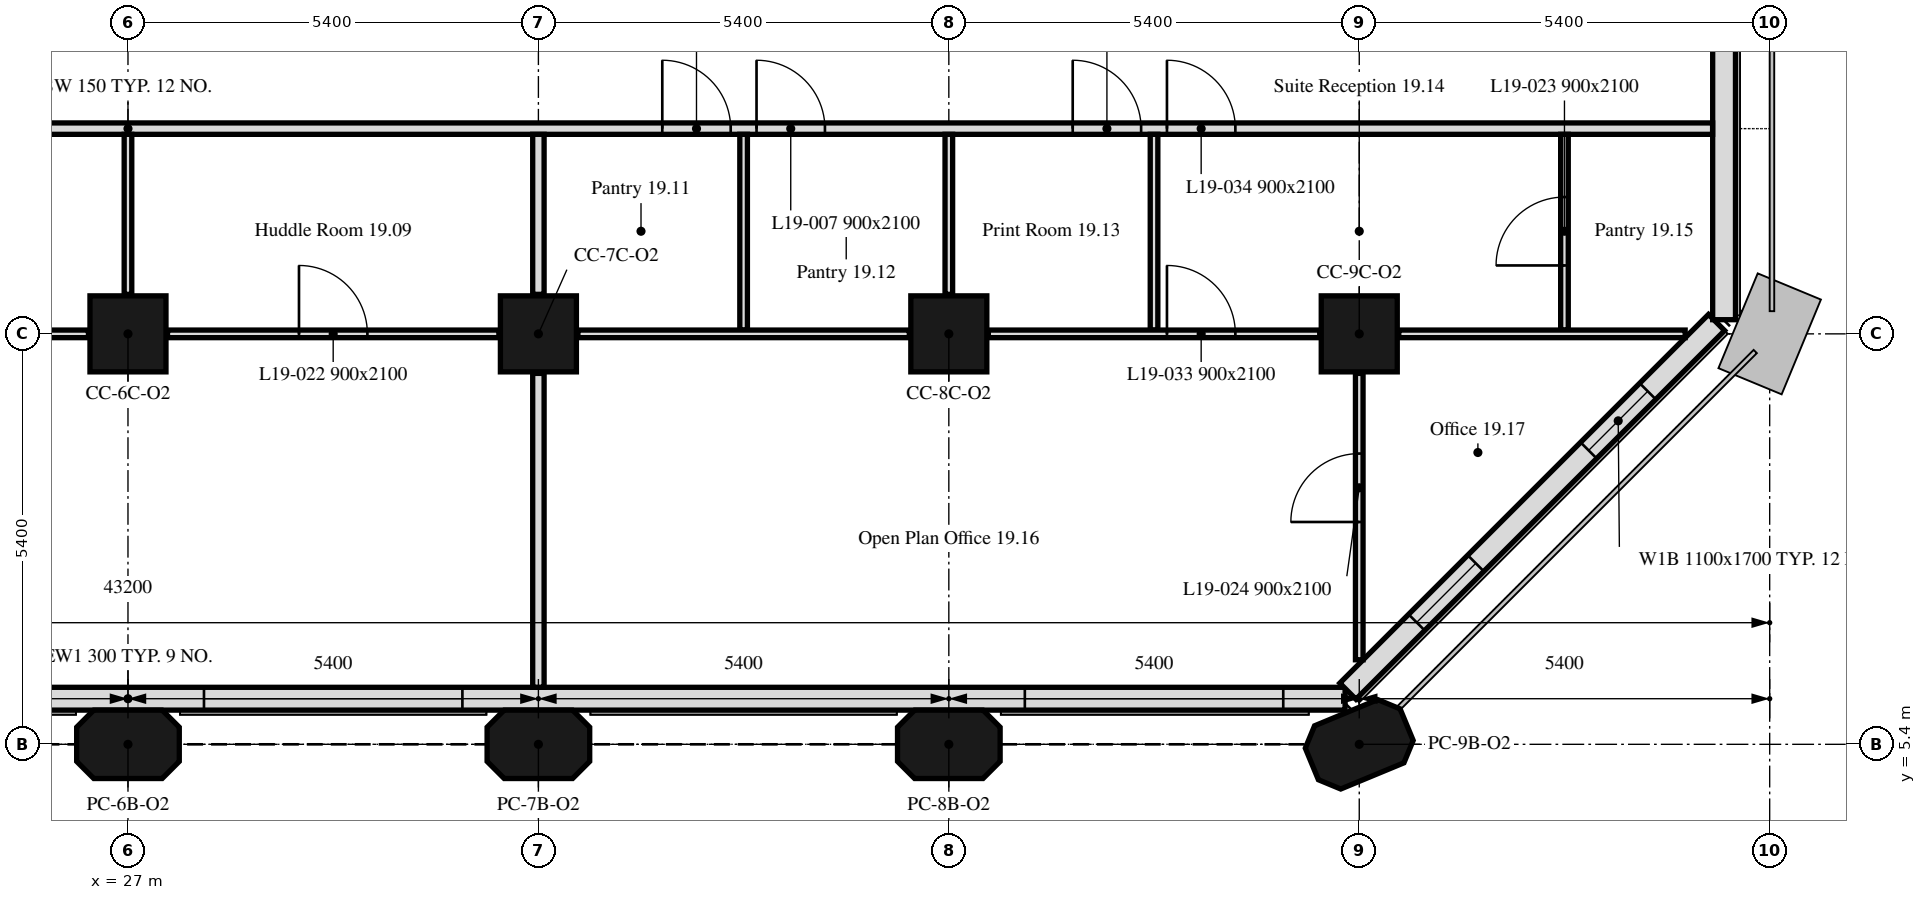
"""IFC4 building model, lengths in metres.
Left out: names, types, materials, properties, quantities, classifications, styles, units other than length and angle.
Written with IfcOpenShell. Run it as: python <this file> out.ifc"""

import sys

from ifc_helpers import new_model, si_unit, direction, frame, frame_2d, origin, origin_2d, place, context, subcontext, project, spatial, polyline, rectangle, outline, extrude, element, fill, save


model = new_model("IFC4")
c1 = context("Model", 3, precision=1e-05, world=origin(), true_north=direction((0.0, 1.0)))
c2 = subcontext(c1, "Body", "Model", "MODEL_VIEW")
j1 = project(units=[si_unit("LENGTHUNIT", "METRE"), si_unit("PLANEANGLEUNIT", "RADIAN")], contexts=[c1])
p1 = place(None, origin())
s1 = spatial("IfcSite", under=j1, at=p1, CompositionType="ELEMENT")
p2 = place(p1, origin())
s2 = spatial("IfcBuilding", under=s1, at=p2, CompositionType="ELEMENT")
p3 = place(p2, frame((0.0, 0.0, 84.0)))
s3 = spatial("IfcBuildingStorey", under=s2, at=p3, CompositionType="ELEMENT", Elevation=84.0)
for number, where, z_axis, x_axis in (
    (1, (27.0, 5.4, 0.0), (0.0, 0.0, 1.0), (1.0, 0.0, 0.0)),
    (2, (32.4, 5.4, 0.0), (0.0, 0.0, 1.0), (1.0, 0.0, 0.0)),
    (3, (37.8, 5.4, 0.0), (0.0, 0.0, 1.0), (1.0, 0.0, 0.0)),
    (4, (43.2, 5.4, 0.0), (0.0, 0.0, 1.0), (0.924, 0.383, 0.0)),
):
    element("IfcColumn", number, at=place(p3, frame(where, z_axis=z_axis, x_axis=x_axis)), inside=s3, PredefinedType="COLUMN", context=c2, shape_type="SweptSolid", body=[
        extrude(outline(polyline([(-0.45, -0.45), (0.45, -0.45), (0.675, -0.225), (0.675, 0.225), (0.45, 0.45), (-0.45, 0.45), (-0.675, 0.225), (-0.675, -0.225), (-0.45, -0.45)])), origin(), (0.0, 0.0, 1.0), 3.5),
    ])
for number, where, z_axis, x_axis in (
    (5, (27.0, 10.8, 0.0), (0.0, 0.0, 1.0), (1.0, 0.0, 0.0)),
    (6, (32.4, 10.8, 0.0), (0.0, 0.0, 1.0), (1.0, 0.0, 0.0)),
    (7, (37.8, 10.8, 0.0), (0.0, 0.0, 1.0), (1.0, 0.0, 0.0)),
    (8, (43.2, 10.8, 0.0), (0.0, 0.0, 1.0), (1.0, 0.0, 0.0)),
):
    element("IfcColumn", number, at=place(p3, frame(where, z_axis=z_axis, x_axis=x_axis)), inside=s3, PredefinedType="COLUMN", context=c2, shape_type="SweptSolid", body=[
        extrude(rectangle(XDim=1.0, YDim=1.0, at=origin_2d()), origin(), (0.0, 0.0, 1.0), 3.5),
    ])
p4 = place(p3, frame((10.986, 6.0, 0.0), z_axis=(0.0, 0.0, 1.0), x_axis=(1.0, 0.0, 0.0)))
e9 = element("IfcWall", 9, at=p4, inside=s3, PredefinedType="SOLIDWALL", context=c2, shape_type="SweptSolid", body=[
    extrude(rectangle(XDim=32.027, YDim=0.3, at=frame_2d((16.014, 0.0))), origin(), (0.0, 0.0, 1.0), 3.5),
])
p5 = place(p4, frame((6.214, 0.0, 0.9)))
e10 = element("IfcOpeningElement", 10, at=p5, cuts=e9, PredefinedType="OPENING", context=c2, shape_type="SweptSolid", body=[
    extrude(rectangle(XDim=3.4, YDim=1.7, at=frame_2d((1.7, 0.85))), frame((0.0, 0.16, 0.0), z_axis=(0.0, -1.0, 0.0), x_axis=(1.0, 0.0, 0.0)), (0.0, 0.0, 1.0), 0.32),
])
p6 = place(p4, frame((17.014, 0.0, 0.9)))
e11 = element("IfcOpeningElement", 11, at=p6, cuts=e9, PredefinedType="OPENING", context=c2, shape_type="SweptSolid", body=[
    extrude(rectangle(XDim=3.4, YDim=1.7, at=frame_2d((1.7, 0.85))), frame((0.0, 0.16, 0.0), z_axis=(0.0, -1.0, 0.0), x_axis=(1.0, 0.0, 0.0)), (0.0, 0.0, 1.0), 0.32),
])
p7 = place(p4, frame((27.814, 0.0, 0.9)))
e12 = element("IfcOpeningElement", 12, at=p7, cuts=e9, PredefinedType="OPENING", context=c2, shape_type="SweptSolid", body=[
    extrude(rectangle(XDim=3.4, YDim=1.7, at=frame_2d((1.7, 0.85))), frame((0.0, 0.16, 0.0), z_axis=(0.0, -1.0, 0.0), x_axis=(1.0, 0.0, 0.0)), (0.0, 0.0, 1.0), 0.32),
])
p8 = place(p3, frame((43.051, 6.099, 0.0), z_axis=(0.0, 0.0, 1.0), x_axis=(0.707106781187, 0.707106781187, 0.0)))
e13 = element("IfcWall", 13, at=p8, inside=s3, PredefinedType="SOLIDWALL", context=c2, shape_type="SweptSolid", body=[
    extrude(rectangle(XDim=6.86, YDim=0.3, at=frame_2d((3.43, 0.0))), origin(), (0.0, 0.0, 1.0), 3.5),
])
p9 = place(p8, frame((1.28, 0.0, 0.9)))
e14 = element("IfcOpeningElement", 14, at=p9, cuts=e13, PredefinedType="OPENING", context=c2, shape_type="SweptSolid", body=[
    extrude(rectangle(XDim=1.1, YDim=1.7, at=frame_2d((0.55, 0.85))), frame((0.0, 0.16, 0.0), z_axis=(0.0, -1.0, 0.0), x_axis=(1.0, 0.0, 0.0)), (0.0, 0.0, 1.0), 0.32),
])
p10 = place(p8, frame((4.48, 0.0, 0.9)))
e15 = element("IfcOpeningElement", 15, at=p10, cuts=e13, PredefinedType="OPENING", context=c2, shape_type="SweptSolid", body=[
    extrude(rectangle(XDim=1.1, YDim=1.7, at=frame_2d((0.55, 0.85))), frame((0.0, 0.16, 0.0), z_axis=(0.0, -1.0, 0.0), x_axis=(1.0, 0.0, 0.0)), (0.0, 0.0, 1.0), 0.32),
])
p11 = place(p3, frame((48.0, 10.986, 0.0), z_axis=(0.0, 0.0, 1.0), x_axis=(0.0, 1.0, 0.0)))
e16 = element("IfcWall", 16, at=p11, inside=s3, PredefinedType="SOLIDWALL", context=c2, shape_type="SweptSolid", body=[
    extrude(rectangle(XDim=32.027, YDim=0.3, at=frame_2d((16.014, 0.0))), origin(), (0.0, 0.0, 1.0), 3.5),
])
p12 = place(p11, frame((6.214, 0.0, 0.9)))
e17 = element("IfcOpeningElement", 17, at=p12, cuts=e16, PredefinedType="OPENING", context=c2, shape_type="SweptSolid", body=[
    extrude(rectangle(XDim=3.4, YDim=1.7, at=frame_2d((1.7, 0.85))), frame((0.0, 0.16, 0.0), z_axis=(0.0, -1.0, 0.0), x_axis=(1.0, 0.0, 0.0)), (0.0, 0.0, 1.0), 0.32),
])
p13 = place(p11, frame((17.014, 0.0, 0.9)))
e18 = element("IfcOpeningElement", 18, at=p13, cuts=e16, PredefinedType="OPENING", context=c2, shape_type="SweptSolid", body=[
    extrude(rectangle(XDim=3.4, YDim=1.7, at=frame_2d((1.7, 0.85))), frame((0.0, 0.16, 0.0), z_axis=(0.0, -1.0, 0.0), x_axis=(1.0, 0.0, 0.0)), (0.0, 0.0, 1.0), 0.32),
])
p14 = place(p11, frame((27.814, 0.0, 0.9)))
e19 = element("IfcOpeningElement", 19, at=p14, cuts=e16, PredefinedType="OPENING", context=c2, shape_type="SweptSolid", body=[
    extrude(rectangle(XDim=3.4, YDim=1.7, at=frame_2d((1.7, 0.85))), frame((0.0, 0.16, 0.0), z_axis=(0.0, -1.0, 0.0), x_axis=(1.0, 0.0, 0.0)), (0.0, 0.0, 1.0), 0.32),
])
p15 = place(p3, frame((6.151, 13.5, 0.0), z_axis=(0.0, 0.0, 1.0), x_axis=(1.0, 0.0, 0.0)))
e20 = element("IfcWall", 20, at=p15, inside=s3, PredefinedType="PARTITIONING", context=c2, shape_type="SweptSolid", body=[
    extrude(rectangle(XDim=41.698, YDim=0.15, at=frame_2d((20.849, 0.0))), origin(), (0.0, 0.0, 1.0), 3.5),
])
p16 = place(p15, frame((11.679, 0.0, 0.0)))
e21 = element("IfcOpeningElement", 21, at=p16, cuts=e20, PredefinedType="OPENING", context=c2, shape_type="SweptSolid", body=[
    extrude(rectangle(XDim=0.9, YDim=2.1, at=frame_2d((0.45, 1.05))), frame((0.0, 0.075, 0.0), z_axis=(0.0, -1.0, 0.0), x_axis=(1.0, 0.0, 0.0)), (0.0, 0.0, 1.0), 0.15),
])
p17 = place(p15, frame((27.879, 0.0, 0.0)))
e22 = element("IfcOpeningElement", 22, at=p17, cuts=e20, PredefinedType="OPENING", context=c2, shape_type="SweptSolid", body=[
    extrude(rectangle(XDim=0.9, YDim=2.1, at=frame_2d((0.45, 1.05))), frame((0.0, 0.075, 0.0), z_axis=(0.0, -1.0, 0.0), x_axis=(1.0, 0.0, 0.0)), (0.0, 0.0, 1.0), 0.15),
])
p18 = place(p15, frame((29.119, 0.0, 0.0)))
e23 = element("IfcOpeningElement", 23, at=p18, cuts=e20, PredefinedType="OPENING", context=c2, shape_type="SweptSolid", body=[
    extrude(rectangle(XDim=0.9, YDim=2.1, at=frame_2d((0.45, 1.05))), frame((0.0, 0.075, 0.0), z_axis=(0.0, -1.0, 0.0), x_axis=(1.0, 0.0, 0.0)), (0.0, 0.0, 1.0), 0.15),
])
p19 = place(p15, frame((33.279, 0.0, 0.0)))
e24 = element("IfcOpeningElement", 24, at=p19, cuts=e20, PredefinedType="OPENING", context=c2, shape_type="SweptSolid", body=[
    extrude(rectangle(XDim=0.9, YDim=2.1, at=frame_2d((0.45, 1.05))), frame((0.0, 0.075, 0.0), z_axis=(0.0, -1.0, 0.0), x_axis=(1.0, 0.0, 0.0)), (0.0, 0.0, 1.0), 0.15),
])
p20 = place(p15, frame((2.174, 0.0, 0.0)))
e25 = element("IfcOpeningElement", 25, at=p20, cuts=e20, PredefinedType="OPENING", context=c2, shape_type="SweptSolid", body=[
    extrude(rectangle(XDim=0.9, YDim=2.1, at=frame_2d((0.45, 1.05))), frame((0.0, 0.075, 0.0), z_axis=(0.0, -1.0, 0.0), x_axis=(1.0, 0.0, 0.0)), (0.0, 0.0, 1.0), 0.15),
])
p21 = place(p15, frame((34.519, 0.0, 0.0)))
e26 = element("IfcOpeningElement", 26, at=p21, cuts=e20, PredefinedType="OPENING", context=c2, shape_type="SweptSolid", body=[
    extrude(rectangle(XDim=0.9, YDim=2.1, at=frame_2d((0.45, 1.05))), frame((0.0, 0.075, 0.0), z_axis=(0.0, -1.0, 0.0), x_axis=(1.0, 0.0, 0.0)), (0.0, 0.0, 1.0), 0.15),
])
p22 = place(p3, frame((22.12, 10.8, 0.0), z_axis=(0.0, 0.0, 1.0), x_axis=(1.0, 0.0, 0.0)))
e27 = element("IfcWall", 27, at=p22, inside=s3, PredefinedType="PARTITIONING", context=c2, shape_type="SweptSolid", body=[
    extrude(rectangle(XDim=4.36, YDim=0.1, at=frame_2d((2.18, 0.0))), origin(), (0.0, 0.0, 1.0), 3.5),
])
p23 = place(p22, frame((1.73, 0.0, 0.0)))
e28 = element("IfcOpeningElement", 28, at=p23, cuts=e27, PredefinedType="OPENING", context=c2, shape_type="SweptSolid", body=[
    extrude(rectangle(XDim=0.9, YDim=2.1, at=frame_2d((0.45, 1.05))), frame((0.0, 0.05, 0.0), z_axis=(0.0, -1.0, 0.0), x_axis=(1.0, 0.0, 0.0)), (0.0, 0.0, 1.0), 0.1),
])
p24 = place(p3, frame((27.0, 11.32, 0.0), z_axis=(0.0, 0.0, 1.0), x_axis=(0.0, 1.0, 0.0)))
e29 = element("IfcWall", 29, at=p24, inside=s3, PredefinedType="PARTITIONING", context=c2, shape_type="SweptSolid", body=[
    extrude(rectangle(XDim=2.105, YDim=0.1, at=frame_2d((1.052, 0.0))), origin(), (0.0, 0.0, 1.0), 3.5),
])
p25 = place(p3, frame((27.52, 10.8, 0.0), z_axis=(0.0, 0.0, 1.0), x_axis=(1.0, 0.0, 0.0)))
e30 = element("IfcWall", 30, at=p25, inside=s3, PredefinedType="PARTITIONING", context=c2, shape_type="SweptSolid", body=[
    extrude(rectangle(XDim=4.36, YDim=0.1, at=frame_2d((2.18, 0.0))), origin(), (0.0, 0.0, 1.0), 3.5),
])
p26 = place(p25, frame((1.73, 0.0, 0.0)))
e31 = element("IfcOpeningElement", 31, at=p26, cuts=e30, PredefinedType="OPENING", context=c2, shape_type="SweptSolid", body=[
    extrude(rectangle(XDim=0.9, YDim=2.1, at=frame_2d((0.45, 1.05))), frame((0.0, 0.05, 0.0), z_axis=(0.0, -1.0, 0.0), x_axis=(1.0, 0.0, 0.0)), (0.0, 0.0, 1.0), 0.1),
])
p27 = place(p3, frame((32.4, 11.32, 0.0), z_axis=(0.0, 0.0, 1.0), x_axis=(0.0, 1.0, 0.0)))
e32 = element("IfcWall", 32, at=p27, inside=s3, PredefinedType="PARTITIONING", context=c2, shape_type="SweptSolid", body=[
    extrude(rectangle(XDim=2.105, YDim=0.15, at=frame_2d((1.052, 0.0))), origin(), (0.0, 0.0, 1.0), 3.5),
])
p28 = place(p3, frame((32.4, 6.151, 0.0), z_axis=(0.0, 0.0, 1.0), x_axis=(0.0, 1.0, 0.0)))
e33 = element("IfcWall", 33, at=p28, inside=s3, PredefinedType="PARTITIONING", context=c2, shape_type="SweptSolid", body=[
    extrude(rectangle(XDim=4.129, YDim=0.15, at=frame_2d((2.064, 0.0))), origin(), (0.0, 0.0, 1.0), 3.5),
])
p29 = place(p3, frame((35.1, 10.85, 0.0), z_axis=(0.0, 0.0, 1.0), x_axis=(0.0, 1.0, 0.0)))
e34 = element("IfcWall", 34, at=p29, inside=s3, PredefinedType="PARTITIONING", context=c2, shape_type="SweptSolid", body=[
    extrude(rectangle(XDim=2.575, YDim=0.1, at=frame_2d((1.288, 0.0))), origin(), (0.0, 0.0, 1.0), 3.5),
])
p30 = place(p3, frame((32.92, 10.8, 0.0), z_axis=(0.0, 0.0, 1.0), x_axis=(1.0, 0.0, 0.0)))
e35 = element("IfcWall", 35, at=p30, inside=s3, PredefinedType="PARTITIONING", context=c2, shape_type="SweptSolid", body=[
    extrude(rectangle(XDim=4.36, YDim=0.1, at=frame_2d((2.18, 0.0))), origin(), (0.0, 0.0, 1.0), 3.5),
])
p31 = place(p3, frame((37.8, 11.32, 0.0), z_axis=(0.0, 0.0, 1.0), x_axis=(0.0, 1.0, 0.0)))
e36 = element("IfcWall", 36, at=p31, inside=s3, PredefinedType="PARTITIONING", context=c2, shape_type="SweptSolid", body=[
    extrude(rectangle(XDim=2.105, YDim=0.1, at=frame_2d((1.052, 0.0))), origin(), (0.0, 0.0, 1.0), 3.5),
])
p32 = place(p3, frame((40.5, 10.85, 0.0), z_axis=(0.0, 0.0, 1.0), x_axis=(0.0, 1.0, 0.0)))
e37 = element("IfcWall", 37, at=p32, inside=s3, PredefinedType="PARTITIONING", context=c2, shape_type="SweptSolid", body=[
    extrude(rectangle(XDim=2.575, YDim=0.1, at=frame_2d((1.288, 0.0))), origin(), (0.0, 0.0, 1.0), 3.5),
])
p33 = place(p3, frame((38.32, 10.8, 0.0), z_axis=(0.0, 0.0, 1.0), x_axis=(1.0, 0.0, 0.0)))
e38 = element("IfcWall", 38, at=p33, inside=s3, PredefinedType="PARTITIONING", context=c2, shape_type="SweptSolid", body=[
    extrude(rectangle(XDim=4.36, YDim=0.1, at=frame_2d((2.18, 0.0))), origin(), (0.0, 0.0, 1.0), 3.5),
])
p34 = place(p33, frame((2.35, 0.0, 0.0)))
e39 = element("IfcOpeningElement", 39, at=p34, cuts=e38, PredefinedType="OPENING", context=c2, shape_type="SweptSolid", body=[
    extrude(rectangle(XDim=0.9, YDim=2.1, at=frame_2d((0.45, 1.05))), frame((0.0, 0.05, 0.0), z_axis=(0.0, -1.0, 0.0), x_axis=(1.0, 0.0, 0.0)), (0.0, 0.0, 1.0), 0.1),
])
p35 = place(p3, frame((45.9, 10.85, 0.0), z_axis=(0.0, 0.0, 1.0), x_axis=(0.0, 1.0, 0.0)))
e40 = element("IfcWall", 40, at=p35, inside=s3, PredefinedType="PARTITIONING", context=c2, shape_type="SweptSolid", body=[
    extrude(rectangle(XDim=2.575, YDim=0.1, at=frame_2d((1.288, 0.0))), origin(), (0.0, 0.0, 1.0), 3.5),
])
p36 = place(p35, frame((0.85, 0.0, 0.0)))
e41 = element("IfcOpeningElement", 41, at=p36, cuts=e40, PredefinedType="OPENING", context=c2, shape_type="SweptSolid", body=[
    extrude(rectangle(XDim=0.9, YDim=2.1, at=frame_2d((0.45, 1.05))), frame((0.0, 0.05, 0.0), z_axis=(0.0, -1.0, 0.0), x_axis=(1.0, 0.0, 0.0)), (0.0, 0.0, 1.0), 0.1),
])
p37 = place(p3, frame((43.72, 10.8, 0.0), z_axis=(0.0, 0.0, 1.0), x_axis=(1.0, 0.0, 0.0)))
e42 = element("IfcWall", 42, at=p37, inside=s3, PredefinedType="PARTITIONING", context=c2, shape_type="SweptSolid", body=[
    extrude(rectangle(XDim=3.768, YDim=0.1, at=frame_2d((1.884, 0.0))), origin(), (0.0, 0.0, 1.0), 3.5),
])
p38 = place(p3, frame((43.2, 6.512, 0.0), z_axis=(0.0, 0.0, 1.0), x_axis=(0.0, 1.0, 0.0)))
e43 = element("IfcWall", 43, at=p38, inside=s3, PredefinedType="PARTITIONING", context=c2, shape_type="SweptSolid", body=[
    extrude(rectangle(XDim=3.768, YDim=0.1, at=frame_2d((1.884, 0.0))), origin(), (0.0, 0.0, 1.0), 3.5),
])
p39 = place(p38, frame((1.813, 0.0, 0.0)))
e44 = element("IfcOpeningElement", 44, at=p39, cuts=e43, PredefinedType="OPENING", context=c2, shape_type="SweptSolid", body=[
    extrude(rectangle(XDim=0.9, YDim=2.1, at=frame_2d((0.45, 1.05))), frame((0.0, 0.05, 0.0), z_axis=(0.0, -1.0, 0.0), x_axis=(1.0, 0.0, 0.0)), (0.0, 0.0, 1.0), 0.1),
])
p40 = place(p6, origin())
e45 = element("IfcWindow", 45, at=p40, inside=s3, PartitioningType="SINGLE_PANEL", PredefinedType="WINDOW", context=c2, shape_type="SweptSolid", body=[
    extrude(rectangle(XDim=3.4, YDim=1.7, at=frame_2d((1.7, 0.85))), frame((0.0, 0.03, 0.0), z_axis=(0.0, -1.0, 0.0), x_axis=(1.0, 0.0, 0.0)), (0.0, 0.0, 1.0), 0.06),
])
fill(e11, e45)
p41 = place(p7, origin())
e46 = element("IfcWindow", 46, at=p41, inside=s3, PartitioningType="SINGLE_PANEL", PredefinedType="WINDOW", context=c2, shape_type="SweptSolid", body=[
    extrude(rectangle(XDim=3.4, YDim=1.7, at=frame_2d((1.7, 0.85))), frame((0.0, 0.03, 0.0), z_axis=(0.0, -1.0, 0.0), x_axis=(1.0, 0.0, 0.0)), (0.0, 0.0, 1.0), 0.06),
])
fill(e12, e46)
p42 = place(p9, origin())
e47 = element("IfcWindow", 47, at=p42, inside=s3, PartitioningType="SINGLE_PANEL", PredefinedType="WINDOW", context=c2, shape_type="SweptSolid", body=[
    extrude(rectangle(XDim=1.1, YDim=1.7, at=frame_2d((0.55, 0.85))), frame((0.0, 0.03, 0.0), z_axis=(0.0, -1.0, 0.0), x_axis=(1.0, 0.0, 0.0)), (0.0, 0.0, 1.0), 0.06),
])
fill(e14, e47)
p43 = place(p10, origin())
e48 = element("IfcWindow", 48, at=p43, inside=s3, PartitioningType="SINGLE_PANEL", PredefinedType="WINDOW", context=c2, shape_type="SweptSolid", body=[
    extrude(rectangle(XDim=1.1, YDim=1.7, at=frame_2d((0.55, 0.85))), frame((0.0, 0.03, 0.0), z_axis=(0.0, -1.0, 0.0), x_axis=(1.0, 0.0, 0.0)), (0.0, 0.0, 1.0), 0.06),
])
fill(e15, e48)
p44 = place(p17, origin())
e49 = element("IfcDoor", 49, at=p44, inside=s3, OperationType="SINGLE_SWING_LEFT", PredefinedType="DOOR", context=c2, shape_type="SweptSolid", body=[
    extrude(rectangle(XDim=0.9, YDim=2.1, at=frame_2d((0.45, 1.05))), frame((0.0, 0.025, 0.0), z_axis=(0.0, -1.0, 0.0), x_axis=(1.0, 0.0, 0.0)), (0.0, 0.0, 1.0), 0.05),
])
fill(e22, e49)
p45 = place(p18, origin())
e50 = element("IfcDoor", 50, at=p45, inside=s3, OperationType="SINGLE_SWING_LEFT", PredefinedType="DOOR", context=c2, shape_type="SweptSolid", body=[
    extrude(rectangle(XDim=0.9, YDim=2.1, at=frame_2d((0.45, 1.05))), frame((0.0, 0.025, 0.0), z_axis=(0.0, -1.0, 0.0), x_axis=(1.0, 0.0, 0.0)), (0.0, 0.0, 1.0), 0.05),
])
fill(e23, e50)
p46 = place(p19, origin())
e51 = element("IfcDoor", 51, at=p46, inside=s3, OperationType="SINGLE_SWING_LEFT", PredefinedType="DOOR", context=c2, shape_type="SweptSolid", body=[
    extrude(rectangle(XDim=0.9, YDim=2.1, at=frame_2d((0.45, 1.05))), frame((0.0, 0.025, 0.0), z_axis=(0.0, -1.0, 0.0), x_axis=(1.0, 0.0, 0.0)), (0.0, 0.0, 1.0), 0.05),
])
fill(e24, e51)
p47 = place(p26, origin())
e52 = element("IfcDoor", 52, at=p47, inside=s3, OperationType="SINGLE_SWING_RIGHT", PredefinedType="DOOR", context=c2, shape_type="SweptSolid", body=[
    extrude(rectangle(XDim=0.9, YDim=2.1, at=frame_2d((0.45, 1.05))), frame((0.0, 0.025, 0.0), z_axis=(0.0, -1.0, 0.0), x_axis=(1.0, 0.0, 0.0)), (0.0, 0.0, 1.0), 0.05),
])
fill(e31, e52)
p48 = place(p36, origin())
e53 = element("IfcDoor", 53, at=p48, inside=s3, OperationType="SINGLE_SWING_LEFT", PredefinedType="DOOR", context=c2, shape_type="SweptSolid", body=[
    extrude(rectangle(XDim=0.9, YDim=2.1, at=frame_2d((0.45, 1.05))), frame((0.0, 0.025, 0.0), z_axis=(0.0, -1.0, 0.0), x_axis=(1.0, 0.0, 0.0)), (0.0, 0.0, 1.0), 0.05),
])
fill(e41, e53)
p49 = place(p39, origin())
e54 = element("IfcDoor", 54, at=p49, inside=s3, OperationType="SINGLE_SWING_LEFT", PredefinedType="DOOR", context=c2, shape_type="SweptSolid", body=[
    extrude(rectangle(XDim=0.9, YDim=2.1, at=frame_2d((0.45, 1.05))), frame((0.0, 0.025, 0.0), z_axis=(0.0, -1.0, 0.0), x_axis=(1.0, 0.0, 0.0)), (0.0, 0.0, 1.0), 0.05),
])
fill(e44, e54)
p50 = place(p34, origin())
e55 = element("IfcDoor", 55, at=p50, inside=s3, OperationType="SINGLE_SWING_LEFT", PredefinedType="DOOR", context=c2, shape_type="SweptSolid", body=[
    extrude(rectangle(XDim=0.9, YDim=2.1, at=frame_2d((0.45, 1.05))), frame((0.0, 0.025, 0.0), z_axis=(0.0, -1.0, 0.0), x_axis=(1.0, 0.0, 0.0)), (0.0, 0.0, 1.0), 0.05),
])
fill(e39, e55)
p51 = place(p21, origin())
e56 = element("IfcDoor", 56, at=p51, inside=s3, OperationType="SINGLE_SWING_LEFT", PredefinedType="DOOR", context=c2, shape_type="SweptSolid", body=[
    extrude(rectangle(XDim=0.9, YDim=2.1, at=frame_2d((0.45, 1.05))), frame((0.0, 0.025, 0.0), z_axis=(0.0, -1.0, 0.0), x_axis=(1.0, 0.0, 0.0)), (0.0, 0.0, 1.0), 0.05),
])
fill(e26, e56)
save(model, sys.argv[1])
